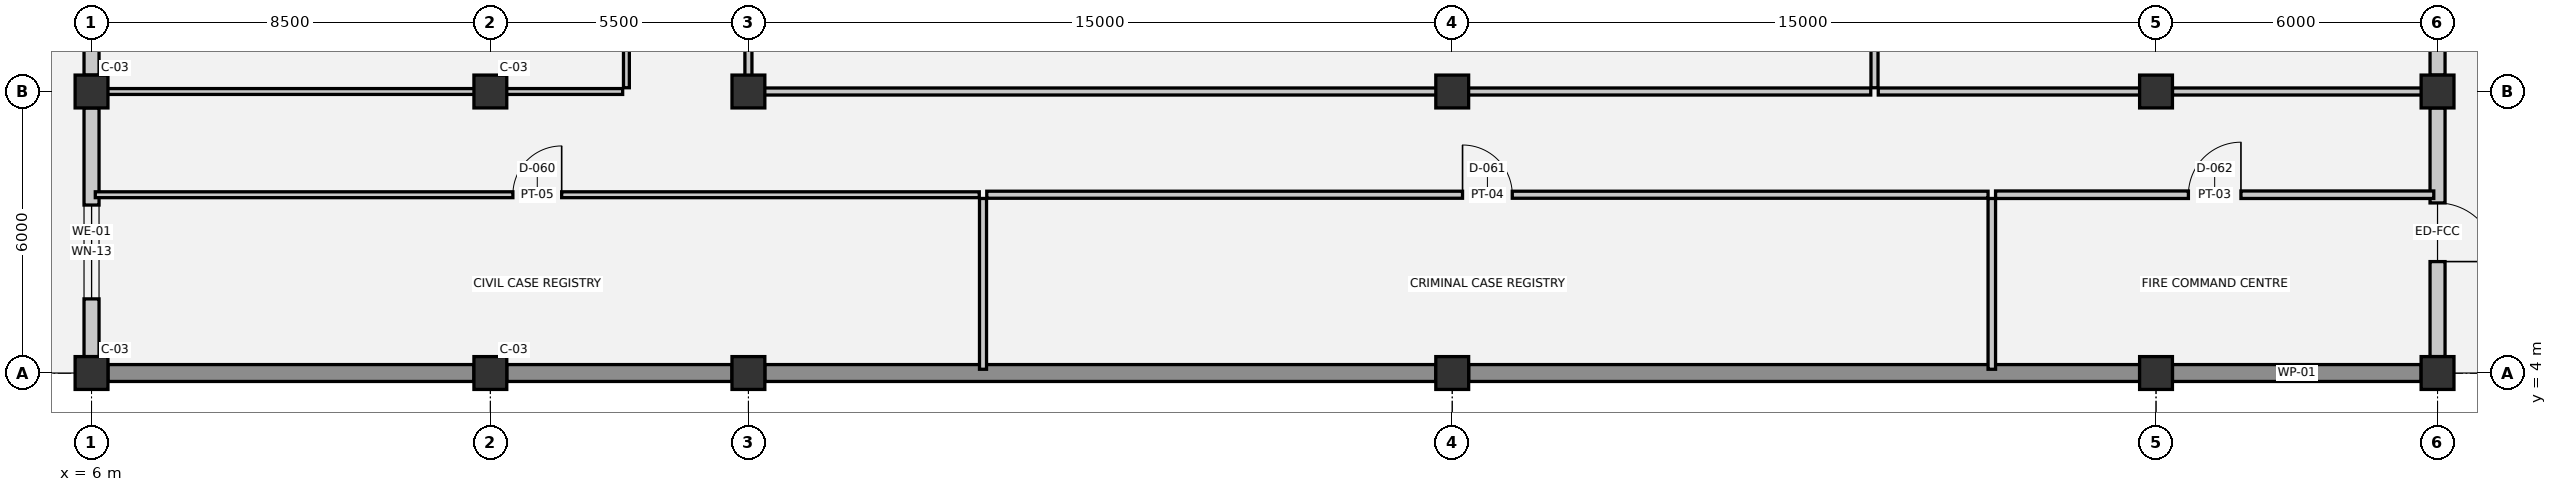
"""IFC4 building model, lengths in metres.
Left out: names, types, materials, properties, quantities, classifications, styles, units other than length and angle.
Written with IfcOpenShell. Run it as: python <this file> out.ifc"""

import sys

from ifc_helpers import new_model, si_unit, direction, frame, frame_2d, origin, origin_2d, place, context, subcontext, project, spatial, rectangle, extrude, element, fill, save


model = new_model("IFC4")
c1 = context("Model", 3, precision=1e-05, world=origin(), true_north=direction((0.0, 1.0)))
c2 = subcontext(c1, "Body", "Model", "MODEL_VIEW")
j1 = project(units=[si_unit("LENGTHUNIT", "METRE"), si_unit("PLANEANGLEUNIT", "RADIAN")], contexts=[c1])
p1 = place(None, origin())
s1 = spatial("IfcSite", under=j1, at=p1, CompositionType="ELEMENT")
p2 = place(p1, origin())
s2 = spatial("IfcBuilding", under=s1, at=p2, CompositionType="ELEMENT")
p3 = place(p2, origin())
s3 = spatial("IfcBuildingStorey", under=s2, at=p3, CompositionType="ELEMENT", Elevation=0.0)
for number, where, z_axis, x_axis in (
    (1, (6.0, 4.0, 0.0), (0.0, 0.0, 1.0), (1.0, 0.0, 0.0)),
    (2, (6.0, 10.0, 0.0), (0.0, 0.0, 1.0), (1.0, 0.0, 0.0)),
    (3, (14.5, 4.0, 0.0), (0.0, 0.0, 1.0), (1.0, 0.0, 0.0)),
    (4, (14.5, 10.0, 0.0), (0.0, 0.0, 1.0), (1.0, 0.0, 0.0)),
    (5, (20.0, 4.0, 0.0), (0.0, 0.0, 1.0), (1.0, 0.0, 0.0)),
    (6, (20.0, 10.0, 0.0), (0.0, 0.0, 1.0), (1.0, 0.0, 0.0)),
    (7, (35.0, 4.0, 0.0), (0.0, 0.0, 1.0), (1.0, 0.0, 0.0)),
    (8, (35.0, 10.0, 0.0), (0.0, 0.0, 1.0), (1.0, 0.0, 0.0)),
    (9, (50.0, 4.0, 0.0), (0.0, 0.0, 1.0), (1.0, 0.0, 0.0)),
    (10, (50.0, 10.0, 0.0), (0.0, 0.0, 1.0), (1.0, 0.0, 0.0)),
    (11, (56.0, 4.0, 0.0), (0.0, 0.0, 1.0), (1.0, 0.0, 0.0)),
    (12, (56.0, 10.0, 0.0), (0.0, 0.0, 1.0), (1.0, 0.0, 0.0)),
):
    element("IfcColumn", number, at=place(p3, frame(where, z_axis=z_axis, x_axis=x_axis)), inside=s3, PredefinedType="COLUMN", context=c2, shape_type="SweptSolid", body=[
        extrude(rectangle(XDim=0.7, YDim=0.7, at=origin_2d()), origin(), (0.0, 0.0, 1.0), 5.4),
    ])
p4 = place(p3, frame((6.0, 4.35, 0.0), z_axis=(0.0, 0.0, 1.0), x_axis=(0.0, 1.0, 0.0)))
e13 = element("IfcWall", 13, at=p4, inside=s3, PredefinedType="SOLIDWALL", context=c2, shape_type="SweptSolid", body=[
    extrude(rectangle(XDim=5.3, YDim=0.32, at=frame_2d((2.65, 0.0))), origin(), (0.0, 0.0, 1.0), 4.16),
])
p5 = place(p4, frame((1.23, 0.0, 0.9)))
e14 = element("IfcOpeningElement", 14, at=p5, cuts=e13, PredefinedType="OPENING", context=c2, shape_type="SweptSolid", body=[
    extrude(rectangle(XDim=2.0, YDim=2.2, at=frame_2d((1.0, 1.1))), frame((0.0, 0.17, 0.0), z_axis=(0.0, -1.0, 0.0), x_axis=(1.0, 0.0, 0.0)), (0.0, 0.0, 1.0), 0.34),
])
p6 = place(p3, frame((6.0, 10.35, 0.0), z_axis=(0.0, 0.0, 1.0), x_axis=(0.0, 1.0, 0.0)))
e15 = element("IfcWall", 15, at=p6, inside=s3, PredefinedType="SOLIDWALL", context=c2, shape_type="SweptSolid", body=[
    extrude(rectangle(XDim=6.3, YDim=0.32, at=frame_2d((3.15, 0.0))), origin(), (0.0, 0.0, 1.0), 4.16),
])
p7 = place(p6, frame((2.05, 0.0, 0.0)))
e16 = element("IfcOpeningElement", 16, at=p7, cuts=e15, PredefinedType="OPENING", context=c2, shape_type="SweptSolid", body=[
    extrude(rectangle(XDim=2.2, YDim=2.4, at=frame_2d((1.1, 1.2))), frame((0.0, 0.17, 0.0), z_axis=(0.0, -1.0, 0.0), x_axis=(1.0, 0.0, 0.0)), (0.0, 0.0, 1.0), 0.34),
])
p8 = place(p3, frame((56.0, 16.65, 0.0), z_axis=(0.0, 0.0, 1.0), x_axis=(0.0, -1.0, 0.0)))
e17 = element("IfcWall", 17, at=p8, inside=s3, PredefinedType="SOLIDWALL", context=c2, shape_type="SweptSolid", body=[
    extrude(rectangle(XDim=6.3, YDim=0.32, at=frame_2d((3.15, 0.0))), origin(), (0.0, 0.0, 1.0), 4.16),
])
p9 = place(p8, frame((2.05, 0.0, 0.0)))
e18 = element("IfcOpeningElement", 18, at=p9, cuts=e17, PredefinedType="OPENING", context=c2, shape_type="SweptSolid", body=[
    extrude(rectangle(XDim=2.2, YDim=2.4, at=frame_2d((1.1, 1.2))), frame((0.0, 0.17, 0.0), z_axis=(0.0, -1.0, 0.0), x_axis=(1.0, 0.0, 0.0)), (0.0, 0.0, 1.0), 0.34),
])
p10 = place(p3, frame((56.0, 9.65, 0.0), z_axis=(0.0, 0.0, 1.0), x_axis=(0.0, -1.0, 0.0)))
e19 = element("IfcWall", 19, at=p10, inside=s3, PredefinedType="SOLIDWALL", context=c2, shape_type="SweptSolid", body=[
    extrude(rectangle(XDim=5.3, YDim=0.32, at=frame_2d((2.65, 0.0))), origin(), (0.0, 0.0, 1.0), 4.16),
])
p11 = place(p10, frame((2.025, 0.0, 0.0)))
e20 = element("IfcOpeningElement", 20, at=p11, cuts=e19, PredefinedType="OPENING", context=c2, shape_type="SweptSolid", body=[
    extrude(rectangle(XDim=1.25, YDim=2.15, at=frame_2d((0.625, 1.075))), frame((0.0, 0.17, 0.0), z_axis=(0.0, -1.0, 0.0), x_axis=(1.0, 0.0, 0.0)), (0.0, 0.0, 1.0), 0.34),
])
p12 = place(p3, frame((55.65, 4.0, 0.0), z_axis=(0.0, 0.0, 1.0), x_axis=(-1.0, 0.0, 0.0)))
e21 = element("IfcWall", 21, at=p12, inside=s3, PredefinedType="SOLIDWALL", context=c2, shape_type="SweptSolid", body=[
    extrude(rectangle(XDim=5.3, YDim=0.36, at=frame_2d((2.65, 0.0))), origin(), (0.0, 0.0, 1.0), 5.14),
])
for number, where, z_axis, x_axis in (
    (22, (49.65, 4.0, 0.0), (0.0, 0.0, 1.0), (-1.0, 0.0, 0.0)),
    (23, (34.65, 4.0, 0.0), (0.0, 0.0, 1.0), (-1.0, 0.0, 0.0)),
):
    element("IfcWall", number, at=place(p3, frame(where, z_axis=z_axis, x_axis=x_axis)), inside=s3, PredefinedType="SOLIDWALL", context=c2, shape_type="SweptSolid", body=[
        extrude(rectangle(XDim=14.3, YDim=0.36, at=frame_2d((7.15, 0.0))), origin(), (0.0, 0.0, 1.0), 5.14),
    ])
p13 = place(p3, frame((19.65, 4.0, 0.0), z_axis=(0.0, 0.0, 1.0), x_axis=(-1.0, 0.0, 0.0)))
e24 = element("IfcWall", 24, at=p13, inside=s3, PredefinedType="SOLIDWALL", context=c2, shape_type="SweptSolid", body=[
    extrude(rectangle(XDim=4.8, YDim=0.36, at=frame_2d((2.4, 0.0))), origin(), (0.0, 0.0, 1.0), 5.14),
])
p14 = place(p3, frame((14.15, 4.0, 0.0), z_axis=(0.0, 0.0, 1.0), x_axis=(-1.0, 0.0, 0.0)))
e25 = element("IfcWall", 25, at=p14, inside=s3, PredefinedType="SOLIDWALL", context=c2, shape_type="SweptSolid", body=[
    extrude(rectangle(XDim=7.8, YDim=0.36, at=frame_2d((3.9, 0.0))), origin(), (0.0, 0.0, 1.0), 5.14),
])
p15 = place(p3, frame((6.08, 7.8, 0.0), z_axis=(0.0, 0.0, 1.0), x_axis=(1.0, 0.0, 0.0)))
e26 = element("IfcWall", 26, at=p15, inside=s3, PredefinedType="PARTITIONING", context=c2, shape_type="SweptSolid", body=[
    extrude(rectangle(XDim=18.84, YDim=0.125, at=frame_2d((9.42, 0.0))), origin(), (0.0, 0.0, 1.0), 5.04),
])
p16 = place(p15, frame((8.9, 0.0, 0.0)))
e27 = element("IfcOpeningElement", 27, at=p16, cuts=e26, PredefinedType="OPENING", context=c2, shape_type="SweptSolid", body=[
    extrude(rectangle(XDim=1.04, YDim=2.15, at=frame_2d((0.52, 1.075))), frame((0.0, 0.073, 0.0), z_axis=(0.0, -1.0, 0.0), x_axis=(1.0, 0.0, 0.0)), (0.0, 0.0, 1.0), 0.145),
])
p17 = place(p3, frame((25.08, 7.8, 0.0), z_axis=(0.0, 0.0, 1.0), x_axis=(1.0, 0.0, 0.0)))
e28 = element("IfcWall", 28, at=p17, inside=s3, PredefinedType="PARTITIONING", context=c2, shape_type="SweptSolid", body=[
    extrude(rectangle(XDim=21.34, YDim=0.15, at=frame_2d((10.67, 0.0))), origin(), (0.0, 0.0, 1.0), 5.04),
])
p18 = place(p17, frame((10.14, 0.0, 0.0)))
e29 = element("IfcOpeningElement", 29, at=p18, cuts=e28, PredefinedType="OPENING", context=c2, shape_type="SweptSolid", body=[
    extrude(rectangle(XDim=1.06, YDim=2.2, at=frame_2d((0.53, 1.1))), frame((0.0, 0.085, 0.0), z_axis=(0.0, -1.0, 0.0), x_axis=(1.0, 0.0, 0.0)), (0.0, 0.0, 1.0), 0.17),
])
p19 = place(p3, frame((46.58, 7.8, 0.0), z_axis=(0.0, 0.0, 1.0), x_axis=(1.0, 0.0, 0.0)))
e30 = element("IfcWall", 30, at=p19, inside=s3, PredefinedType="PARTITIONING", context=c2, shape_type="SweptSolid", body=[
    extrude(rectangle(XDim=9.34, YDim=0.16, at=frame_2d((4.67, 0.0))), origin(), (0.0, 0.0, 1.0), 5.04),
])
p20 = place(p19, frame((4.11, 0.0, 0.0)))
e31 = element("IfcOpeningElement", 31, at=p20, cuts=e30, PredefinedType="OPENING", context=c2, shape_type="SweptSolid", body=[
    extrude(rectangle(XDim=1.12, YDim=2.2, at=frame_2d((0.56, 1.1))), frame((0.0, 0.09, 0.0), z_axis=(0.0, -1.0, 0.0), x_axis=(1.0, 0.0, 0.0)), (0.0, 0.0, 1.0), 0.18),
])
p21 = place(p3, frame((6.08, 10.0, 0.0), z_axis=(0.0, 0.0, 1.0), x_axis=(1.0, 0.0, 0.0)))
e32 = element("IfcWall", 32, at=p21, inside=s3, PredefinedType="PARTITIONING", context=c2, shape_type="SweptSolid", body=[
    extrude(rectangle(XDim=11.24, YDim=0.125, at=frame_2d((5.62, 0.0))), origin(), (0.0, 0.0, 1.0), 4.43),
])
p22 = place(p3, frame((20.08, 10.0, 0.0), z_axis=(0.0, 0.0, 1.0), x_axis=(1.0, 0.0, 0.0)))
e33 = element("IfcWall", 33, at=p22, inside=s3, PredefinedType="PARTITIONING", context=c2, shape_type="SweptSolid", body=[
    extrude(rectangle(XDim=23.84, YDim=0.15, at=frame_2d((11.92, 0.0))), origin(), (0.0, 0.0, 1.0), 4.18),
])
p23 = place(p3, frame((44.08, 10.0, 0.0), z_axis=(0.0, 0.0, 1.0), x_axis=(1.0, 0.0, 0.0)))
e34 = element("IfcWall", 34, at=p23, inside=s3, PredefinedType="PARTITIONING", context=c2, shape_type="SweptSolid", body=[
    extrude(rectangle(XDim=6.27, YDim=0.15, at=frame_2d((3.135, 0.0))), origin(), (0.0, 0.0, 1.0), 4.18),
])
p24 = place(p3, frame((50.35, 10.0, 0.0), z_axis=(0.0, 0.0, 1.0), x_axis=(1.0, 0.0, 0.0)))
e35 = element("IfcWall", 35, at=p24, inside=s3, PredefinedType="PARTITIONING", context=c2, shape_type="SweptSolid", body=[
    extrude(rectangle(XDim=5.57, YDim=0.15, at=frame_2d((2.785, 0.0))), origin(), (0.0, 0.0, 1.0), 4.43),
])
p25 = place(p3, frame((17.4, 10.08, 0.0), z_axis=(0.0, 0.0, 1.0), x_axis=(0.0, 1.0, 0.0)))
e36 = element("IfcWall", 36, at=p25, inside=s3, PredefinedType="PARTITIONING", context=c2, shape_type="SweptSolid", body=[
    extrude(rectangle(XDim=14.72, YDim=0.125, at=frame_2d((7.36, 0.0))), origin(), (0.0, 0.0, 1.0), 5.04),
])
p26 = place(p25, frame((6.87, 0.0, 0.0)))
e37 = element("IfcOpeningElement", 37, at=p26, cuts=e36, PredefinedType="OPENING", context=c2, shape_type="SweptSolid", body=[
    extrude(rectangle(XDim=0.98, YDim=2.1, at=frame_2d((0.49, 1.05))), frame((0.0, 0.073, 0.0), z_axis=(0.0, -1.0, 0.0), x_axis=(1.0, 0.0, 0.0)), (0.0, 0.0, 1.0), 0.145),
])
p27 = place(p3, frame((20.0, 10.08, 0.0), z_axis=(0.0, 0.0, 1.0), x_axis=(0.0, 1.0, 0.0)))
e38 = element("IfcWall", 38, at=p27, inside=s3, PredefinedType="PARTITIONING", context=c2, shape_type="SweptSolid", body=[
    extrude(rectangle(XDim=6.57, YDim=0.15, at=frame_2d((3.285, 0.0))), origin(), (0.0, 0.0, 1.0), 4.58),
])
p28 = place(p3, frame((25.0, 4.08, 0.0), z_axis=(0.0, 0.0, 1.0), x_axis=(0.0, 1.0, 0.0)))
e39 = element("IfcWall", 39, at=p28, inside=s3, PredefinedType="PARTITIONING", context=c2, shape_type="SweptSolid", body=[
    extrude(rectangle(XDim=3.64, YDim=0.15, at=frame_2d((1.82, 0.0))), origin(), (0.0, 0.0, 1.0), 5.04),
])
p29 = place(p3, frame((44.0, 10.08, 0.0), z_axis=(0.0, 0.0, 1.0), x_axis=(0.0, 1.0, 0.0)))
e40 = element("IfcWall", 40, at=p29, inside=s3, PredefinedType="PARTITIONING", context=c2, shape_type="SweptSolid", body=[
    extrude(rectangle(XDim=14.84, YDim=0.15, at=frame_2d((7.42, 0.0))), origin(), (0.0, 0.0, 1.0), 5.04),
])
p30 = place(p29, frame((6.91, 0.0, 0.0)))
e41 = element("IfcOpeningElement", 41, at=p30, cuts=e40, PredefinedType="OPENING", context=c2, shape_type="SweptSolid", body=[
    extrude(rectangle(XDim=1.02, YDim=2.15, at=frame_2d((0.51, 1.075))), frame((0.0, 0.085, 0.0), z_axis=(0.0, -1.0, 0.0), x_axis=(1.0, 0.0, 0.0)), (0.0, 0.0, 1.0), 0.17),
])
p31 = place(p3, frame((46.5, 4.08, 0.0), z_axis=(0.0, 0.0, 1.0), x_axis=(0.0, 1.0, 0.0)))
e42 = element("IfcWall", 42, at=p31, inside=s3, PredefinedType="PARTITIONING", context=c2, shape_type="SweptSolid", body=[
    extrude(rectangle(XDim=3.64, YDim=0.16, at=frame_2d((1.82, 0.0))), origin(), (0.0, 0.0, 1.0), 5.04),
])
p32 = place(p5, origin())
e43 = element("IfcWindow", 43, at=p32, inside=s3, PartitioningType="SINGLE_PANEL", PredefinedType="WINDOW", context=c2, shape_type="SweptSolid", body=[
    extrude(rectangle(XDim=2.0, YDim=2.2, at=frame_2d((1.0, 1.1))), frame((0.0, 0.03, 0.0), z_axis=(0.0, -1.0, 0.0), x_axis=(1.0, 0.0, 0.0)), (0.0, 0.0, 1.0), 0.06),
])
fill(e14, e43)
p33 = place(p11, origin())
e44 = element("IfcDoor", 44, at=p33, inside=s3, OperationType="SINGLE_SWING_RIGHT", PredefinedType="DOOR", context=c2, shape_type="SweptSolid", body=[
    extrude(rectangle(XDim=1.25, YDim=2.15, at=frame_2d((0.625, 1.075))), frame((0.0, 0.025, 0.0), z_axis=(0.0, -1.0, 0.0), x_axis=(1.0, 0.0, 0.0)), (0.0, 0.0, 1.0), 0.05),
])
fill(e20, e44)
p34 = place(p16, origin())
e45 = element("IfcDoor", 45, at=p34, inside=s3, OperationType="SINGLE_SWING_RIGHT", PredefinedType="DOOR", context=c2, shape_type="SweptSolid", body=[
    extrude(rectangle(XDim=1.04, YDim=2.15, at=frame_2d((0.52, 1.075))), frame((0.0, 0.025, 0.0), z_axis=(0.0, -1.0, 0.0), x_axis=(1.0, 0.0, 0.0)), (0.0, 0.0, 1.0), 0.05),
])
fill(e27, e45)
p35 = place(p18, origin())
e46 = element("IfcDoor", 46, at=p35, inside=s3, OperationType="SINGLE_SWING_LEFT", PredefinedType="DOOR", context=c2, shape_type="SweptSolid", body=[
    extrude(rectangle(XDim=1.06, YDim=2.2, at=frame_2d((0.53, 1.1))), frame((0.0, 0.025, 0.0), z_axis=(0.0, -1.0, 0.0), x_axis=(1.0, 0.0, 0.0)), (0.0, 0.0, 1.0), 0.05),
])
fill(e29, e46)
p36 = place(p20, origin())
e47 = element("IfcDoor", 47, at=p36, inside=s3, OperationType="SINGLE_SWING_RIGHT", PredefinedType="DOOR", context=c2, shape_type="SweptSolid", body=[
    extrude(rectangle(XDim=1.12, YDim=2.2, at=frame_2d((0.56, 1.1))), frame((0.0, 0.025, 0.0), z_axis=(0.0, -1.0, 0.0), x_axis=(1.0, 0.0, 0.0)), (0.0, 0.0, 1.0), 0.05),
])
fill(e31, e47)
save(model, sys.argv[1])
